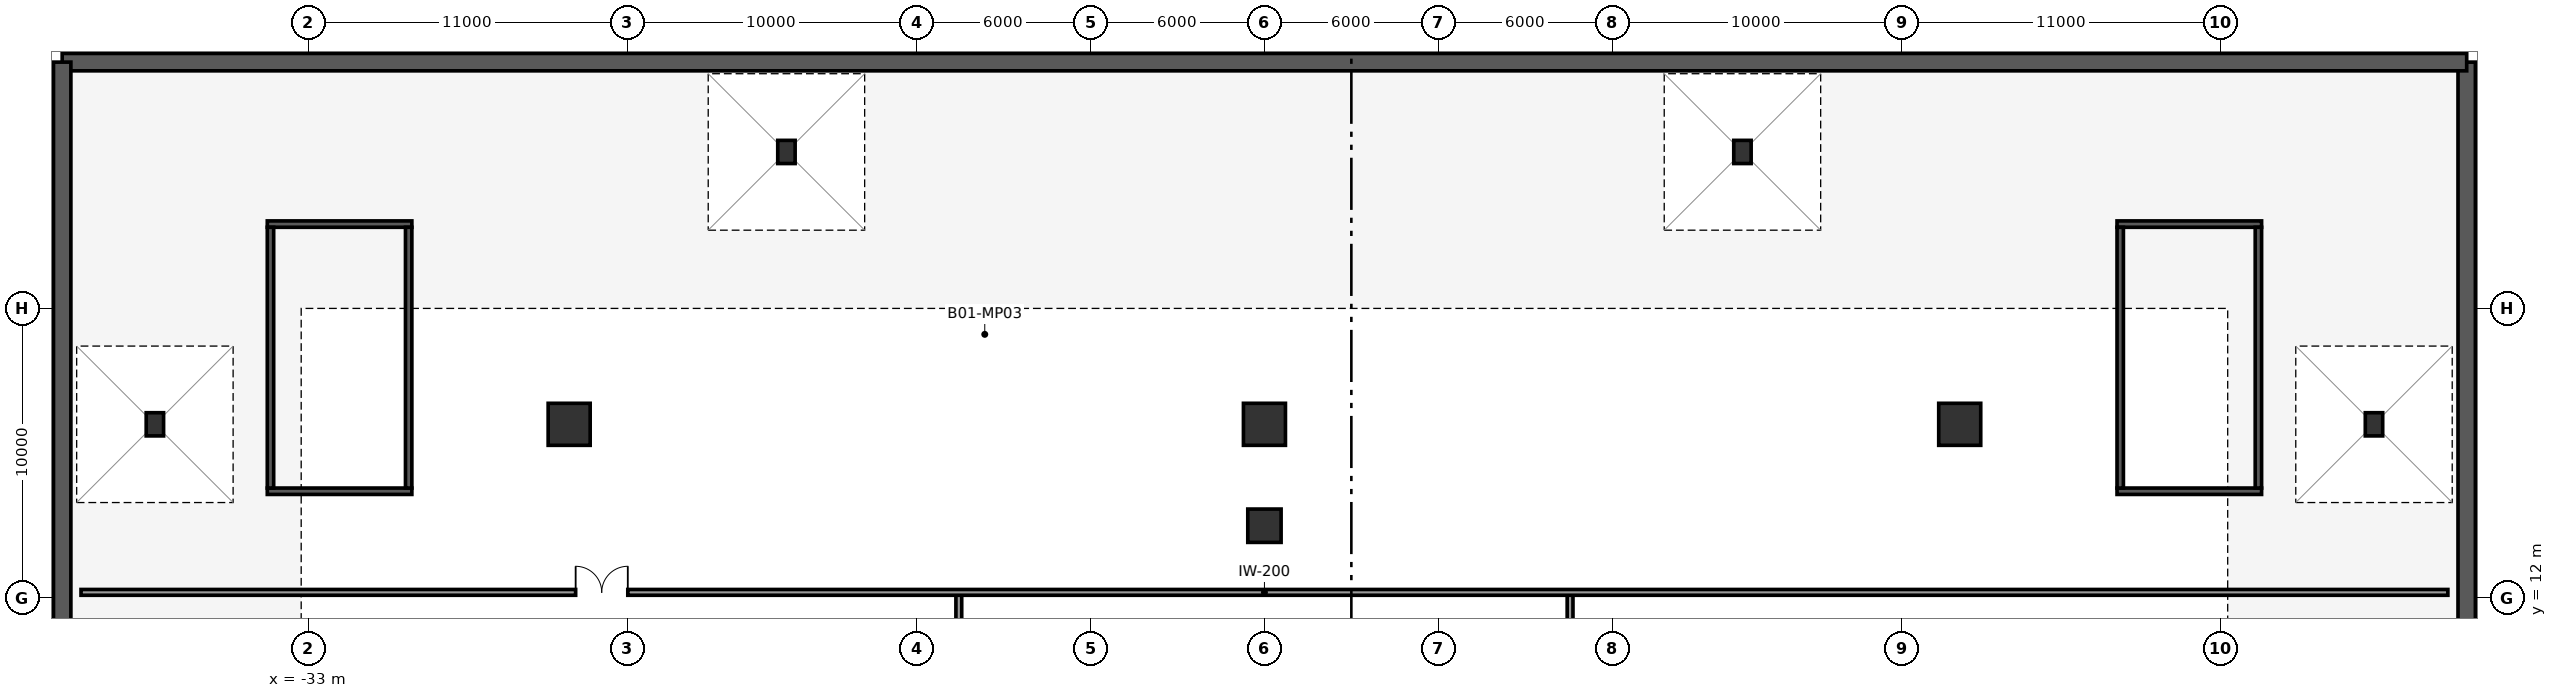
"""IFC4 building model, lengths in metres.
Left out: names, types, materials, properties, quantities, classifications, styles, units other than length and angle.
Written with IfcOpenShell. Run it as: python <this file> out.ifc"""

import sys

from ifc_helpers import new_model, si_unit, direction, frame, frame_2d, origin, origin_2d, place, context, subcontext, project, spatial, rectangle, hollow_rectangle, extrude, element, fill, save


model = new_model("IFC4")
c1 = context("Model", 3, precision=1e-05, world=origin(), true_north=direction((0.0, 1.0)))
c2 = subcontext(c1, "Body", "Model", "MODEL_VIEW")
j1 = project(units=[si_unit("LENGTHUNIT", "METRE"), si_unit("PLANEANGLEUNIT", "RADIAN")], contexts=[c1])
p1 = place(None, origin())
s1 = spatial("IfcSite", under=j1, at=p1, CompositionType="ELEMENT")
p2 = place(p1, origin())
s2 = spatial("IfcBuilding", under=s1, at=p2, CompositionType="ELEMENT")
p3 = place(p2, frame((0.0, 0.0, -5.4)))
s3 = spatial("IfcBuildingStorey", under=s2, at=p3, CompositionType="ELEMENT", Elevation=-5.4)
p4 = place(p3, frame((41.5, -30.5, 0.0), z_axis=(0.0, 0.0, 1.0), x_axis=(0.0, 1.0, 0.0)))
e1 = element("IfcWall", 1, at=p4, inside=s3, PredefinedType="SHEAR", context=c2, shape_type="SweptSolid", body=[
    extrude(rectangle(XDim=61.0, YDim=0.6, at=frame_2d((30.5, 0.0))), origin(), (0.0, 0.0, 1.0), 5.1),
])
p5 = place(p3, frame((41.5, 30.5, 0.0), z_axis=(0.0, 0.0, 1.0), x_axis=(-1.0, 0.0, 0.0)))
e2 = element("IfcWall", 2, at=p5, inside=s3, PredefinedType="SHEAR", context=c2, shape_type="SweptSolid", body=[
    extrude(rectangle(XDim=83.0, YDim=0.6, at=frame_2d((41.5, 0.0))), origin(), (0.0, 0.0, 1.0), 5.1),
])
p6 = place(p3, frame((-41.5, 30.5, 0.0), z_axis=(0.0, 0.0, 1.0), x_axis=(0.0, -1.0, 0.0)))
e3 = element("IfcWall", 3, at=p6, inside=s3, PredefinedType="SHEAR", context=c2, shape_type="SweptSolid", body=[
    extrude(rectangle(XDim=61.0, YDim=0.6, at=frame_2d((30.5, 0.0))), origin(), (0.0, 0.0, 1.0), 5.1),
])
p7 = place(p3, frame((0.0, 14.5, 0.0), z_axis=(0.0, 0.0, 1.0), x_axis=(1.0, 0.0, 0.0)))
e4 = element("IfcColumn", 4, at=p7, inside=s3, PredefinedType="COLUMN", context=c2, shape_type="SweptSolid", body=[
    extrude(rectangle(XDim=1.15, YDim=1.15, at=origin_2d()), origin(), (0.0, 0.0, 1.0), 5.4),
])
for number, where, z_axis, x_axis in (
    (5, (-24.0, 18.0, 0.0), (0.0, 0.0, 1.0), (1.0, 0.0, 0.0)),
    (6, (24.0, 18.0, 0.0), (0.0, 0.0, 1.0), (1.0, 0.0, 0.0)),
    (7, (0.0, 18.0, 0.0), (0.0, 0.0, 1.0), (1.0, 0.0, 0.0)),
):
    element("IfcColumn", number, at=place(p3, frame(where, z_axis=z_axis, x_axis=x_axis)), inside=s3, PredefinedType="COLUMN", context=c2, shape_type="SweptSolid", body=[
        extrude(rectangle(XDim=1.45, YDim=1.45, at=origin_2d()), origin(), (0.0, 0.0, 1.0), 5.4),
    ])
for number, where, z_axis, x_axis in (
    (8, (-38.3, 18.0, 0.0), (0.0, 0.0, 1.0), (1.0, 0.0, 0.0)),
    (9, (38.3, 18.0, 0.0), (0.0, 0.0, 1.0), (1.0, 0.0, 0.0)),
    (10, (-16.5, 27.4, 0.0), (0.0, 0.0, 1.0), (1.0, 0.0, 0.0)),
    (11, (16.5, 27.4, 0.0), (0.0, 0.0, 1.0), (1.0, 0.0, 0.0)),
):
    element("IfcColumn", number, at=place(p3, frame(where, z_axis=z_axis, x_axis=x_axis)), inside=s3, PredefinedType="COLUMN", context=c2, shape_type="SweptSolid", body=[
        extrude(hollow_rectangle(XDim=0.6, YDim=0.8, WallThickness=0.05, at=origin_2d()), origin(), (0.0, 0.0, 1.0), 5.4),
    ])
for number, where, z_axis, x_axis in (
    (12, (-34.42, 15.69, 0.0), (0.0, 0.0, 1.0), (1.0, 0.0, 0.0)),
    (13, (-34.42, 24.91, 0.0), (0.0, 0.0, 1.0), (1.0, 0.0, 0.0)),
):
    element("IfcWall", number, at=place(p3, frame(where, z_axis=z_axis, x_axis=x_axis)), inside=s3, PredefinedType="SHEAR", context=c2, shape_type="SweptSolid", body=[
        extrude(rectangle(XDim=4.99, YDim=0.22, at=frame_2d((2.495, 0.0))), origin(), (0.0, 0.0, 1.0), 5.1),
    ])
for number, where, z_axis, x_axis in (
    (14, (-34.31, 15.8, 0.0), (0.0, 0.0, 1.0), (0.0, 1.0, 0.0)),
    (15, (-29.54, 15.8, 0.0), (0.0, 0.0, 1.0), (0.0, 1.0, 0.0)),
):
    element("IfcWall", number, at=place(p3, frame(where, z_axis=z_axis, x_axis=x_axis)), inside=s3, PredefinedType="SHEAR", context=c2, shape_type="SweptSolid", body=[
        extrude(rectangle(XDim=9.0, YDim=0.22, at=frame_2d((4.5, 0.0))), origin(), (0.0, 0.0, 1.0), 5.1),
    ])
for number, where, z_axis, x_axis in (
    (16, (29.43, 15.69, 0.0), (0.0, 0.0, 1.0), (1.0, 0.0, 0.0)),
    (17, (29.43, 24.91, 0.0), (0.0, 0.0, 1.0), (1.0, 0.0, 0.0)),
):
    element("IfcWall", number, at=place(p3, frame(where, z_axis=z_axis, x_axis=x_axis)), inside=s3, PredefinedType="SHEAR", context=c2, shape_type="SweptSolid", body=[
        extrude(rectangle(XDim=4.99, YDim=0.22, at=frame_2d((2.495, 0.0))), origin(), (0.0, 0.0, 1.0), 5.1),
    ])
for number, where, z_axis, x_axis in (
    (18, (29.54, 15.8, 0.0), (0.0, 0.0, 1.0), (0.0, 1.0, 0.0)),
    (19, (34.31, 15.8, 0.0), (0.0, 0.0, 1.0), (0.0, 1.0, 0.0)),
):
    element("IfcWall", number, at=place(p3, frame(where, z_axis=z_axis, x_axis=x_axis)), inside=s3, PredefinedType="SHEAR", context=c2, shape_type="SweptSolid", body=[
        extrude(rectangle(XDim=9.0, YDim=0.22, at=frame_2d((4.5, 0.0))), origin(), (0.0, 0.0, 1.0), 5.1),
    ])
p8 = place(p3, frame((-10.55, -12.2, 0.0), z_axis=(0.0, 0.0, 1.0), x_axis=(0.0, 1.0, 0.0)))
e20 = element("IfcWall", 20, at=p8, inside=s3, PredefinedType="PARTITIONING", context=c2, shape_type="SweptSolid", body=[
    extrude(rectangle(XDim=24.4, YDim=0.2, at=frame_2d((12.2, 0.0))), origin(), (0.0, 0.0, 1.0), 5.1),
])
p9 = place(p8, frame((11.3, 0.0, 0.0)))
e21 = element("IfcOpeningElement", 21, at=p9, cuts=e20, PredefinedType="OPENING", context=c2, shape_type="SweptSolid", body=[
    extrude(rectangle(XDim=1.8, YDim=2.2, at=frame_2d((0.9, 1.1))), frame((0.0, 0.11, 0.0), z_axis=(0.0, -1.0, 0.0), x_axis=(1.0, 0.0, 0.0)), (0.0, 0.0, 1.0), 0.22),
])
p10 = place(p3, frame((10.55, -12.2, 0.0), z_axis=(0.0, 0.0, 1.0), x_axis=(0.0, 1.0, 0.0)))
e22 = element("IfcWall", 22, at=p10, inside=s3, PredefinedType="PARTITIONING", context=c2, shape_type="SweptSolid", body=[
    extrude(rectangle(XDim=24.4, YDim=0.2, at=frame_2d((12.2, 0.0))), origin(), (0.0, 0.0, 1.0), 5.1),
])
p11 = place(p10, frame((11.3, 0.0, 0.0)))
e23 = element("IfcOpeningElement", 23, at=p11, cuts=e22, PredefinedType="OPENING", context=c2, shape_type="SweptSolid", body=[
    extrude(rectangle(XDim=1.8, YDim=2.2, at=frame_2d((0.9, 1.1))), frame((0.0, 0.11, 0.0), z_axis=(0.0, -1.0, 0.0), x_axis=(1.0, 0.0, 0.0)), (0.0, 0.0, 1.0), 0.22),
])
p12 = place(p3, frame((-40.85, 12.2, 0.0), z_axis=(0.0, 0.0, 1.0), x_axis=(1.0, 0.0, 0.0)))
e24 = element("IfcWall", 24, at=p12, inside=s3, PredefinedType="PARTITIONING", context=c2, shape_type="SweptSolid", body=[
    extrude(rectangle(XDim=81.7, YDim=0.2, at=frame_2d((40.85, 0.0))), origin(), (0.0, 0.0, 1.0), 5.1),
])
p13 = place(p12, frame((17.074, 0.0, 0.0)))
e25 = element("IfcOpeningElement", 25, at=p13, cuts=e24, PredefinedType="OPENING", context=c2, shape_type="SweptSolid", body=[
    extrude(rectangle(XDim=1.8, YDim=2.2, at=frame_2d((0.9, 1.1))), frame((0.0, 0.11, 0.0), z_axis=(0.0, -1.0, 0.0), x_axis=(1.0, 0.0, 0.0)), (0.0, 0.0, 1.0), 0.22),
])
p14 = place(p13, origin())
e26 = element("IfcDoor", 26, at=p14, inside=s3, OperationType="DOUBLE_DOOR_SINGLE_SWING", PredefinedType="DOOR", context=c2, shape_type="SweptSolid", body=[
    extrude(rectangle(XDim=1.8, YDim=2.2, at=frame_2d((0.9, 1.1))), frame((0.0, 0.025, 0.0), z_axis=(0.0, -1.0, 0.0), x_axis=(1.0, 0.0, 0.0)), (0.0, 0.0, 1.0), 0.05),
])
fill(e25, e26)
save(model, sys.argv[1])
